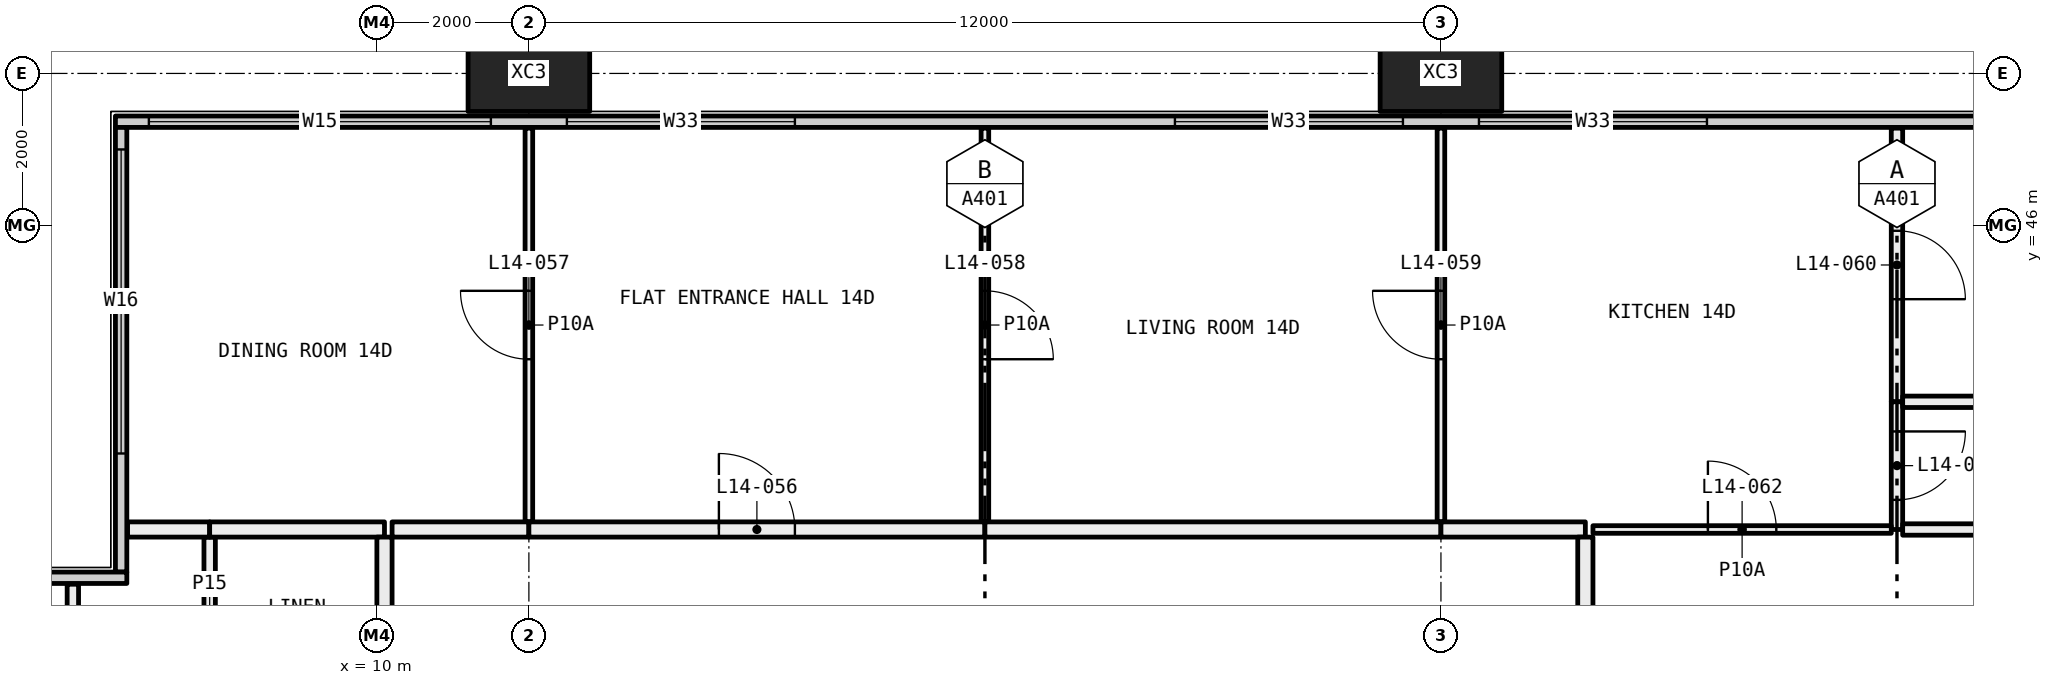
"""IFC4 building model, lengths in metres.
Left out: names, types, materials, properties, quantities, classifications, styles, units other than length and angle.
Written with IfcOpenShell. Run it as: python <this file> out.ifc"""

import sys

from ifc_helpers import new_model, si_unit, direction, frame, frame_2d, origin, origin_2d, place, context, subcontext, project, spatial, rectangle, hollow_rectangle, extrude, element, fill, save


model = new_model("IFC4")
c1 = context("Model", 3, precision=1e-05, world=origin(), true_north=direction((0.0, 1.0)))
c2 = subcontext(c1, "Body", "Model", "MODEL_VIEW")
j1 = project(units=[si_unit("LENGTHUNIT", "METRE"), si_unit("PLANEANGLEUNIT", "RADIAN")], contexts=[c1])
p1 = place(None, origin())
s1 = spatial("IfcSite", under=j1, at=p1, CompositionType="ELEMENT")
p2 = place(p1, origin())
s2 = spatial("IfcBuilding", under=s1, at=p2, CompositionType="ELEMENT")
p3 = place(p2, frame((0.0, 0.0, 61.05)))
s3 = spatial("IfcBuildingStorey", under=s2, at=p3, CompositionType="ELEMENT", Elevation=61.05)
for number, where, z_axis, x_axis in (
    (1, (12.0, 48.0, -0.4), (0.0, 0.0, 1.0), (1.0, 0.0, 0.0)),
    (2, (24.0, 48.0, -0.4), (0.0, 0.0, 1.0), (1.0, 0.0, 0.0)),
):
    element("IfcColumn", number, at=place(p3, frame(where, z_axis=z_axis, x_axis=x_axis)), inside=s3, PredefinedType="COLUMN", context=c2, shape_type="SweptSolid", body=[
        extrude(hollow_rectangle(XDim=1.6, YDim=1.0, WallThickness=0.065, at=origin_2d()), origin(), (0.0, 0.0, 1.0), 3.45),
    ])
p4 = place(p3, frame((6.56, 47.365, 0.0), z_axis=(0.0, 0.0, 1.0), x_axis=(1.0, 0.0, 0.0)))
e3 = element("IfcWall", 3, at=p4, inside=s3, PredefinedType="ELEMENTEDWALL", context=c2, shape_type="SweptSolid", body=[
    extrude(rectangle(XDim=58.88, YDim=0.15, at=frame_2d((29.44, 0.0))), origin(), (0.0, 0.0, 1.0), 3.05),
])
p5 = place(p4, frame((0.44, 0.0, 0.45)))
e4 = element("IfcOpeningElement", 4, at=p5, cuts=e3, PredefinedType="OPENING", context=c2, shape_type="SweptSolid", body=[
    extrude(rectangle(XDim=4.5, YDim=2.55, at=frame_2d((2.25, 1.275))), frame((0.0, 0.085, 0.0), z_axis=(0.0, -1.0, 0.0), x_axis=(1.0, 0.0, 0.0)), (0.0, 0.0, 1.0), 0.17),
])
p6 = place(p4, frame((5.94, 0.0, 0.45)))
e5 = element("IfcOpeningElement", 5, at=p6, cuts=e3, PredefinedType="OPENING", context=c2, shape_type="SweptSolid", body=[
    extrude(rectangle(XDim=3.0, YDim=2.55, at=frame_2d((1.5, 1.275))), frame((0.0, 0.085, 0.0), z_axis=(0.0, -1.0, 0.0), x_axis=(1.0, 0.0, 0.0)), (0.0, 0.0, 1.0), 0.17),
])
p7 = place(p4, frame((13.94, 0.0, 0.45)))
e6 = element("IfcOpeningElement", 6, at=p7, cuts=e3, PredefinedType="OPENING", context=c2, shape_type="SweptSolid", body=[
    extrude(rectangle(XDim=3.0, YDim=2.55, at=frame_2d((1.5, 1.275))), frame((0.0, 0.085, 0.0), z_axis=(0.0, -1.0, 0.0), x_axis=(1.0, 0.0, 0.0)), (0.0, 0.0, 1.0), 0.17),
])
p8 = place(p4, frame((17.94, 0.0, 0.45)))
e7 = element("IfcOpeningElement", 7, at=p8, cuts=e3, PredefinedType="OPENING", context=c2, shape_type="SweptSolid", body=[
    extrude(rectangle(XDim=3.0, YDim=2.55, at=frame_2d((1.5, 1.275))), frame((0.0, 0.085, 0.0), z_axis=(0.0, -1.0, 0.0), x_axis=(1.0, 0.0, 0.0)), (0.0, 0.0, 1.0), 0.17),
])
p9 = place(p4, frame((26.94, 0.0, 0.45)))
e8 = element("IfcOpeningElement", 8, at=p9, cuts=e3, PredefinedType="OPENING", context=c2, shape_type="SweptSolid", body=[
    extrude(rectangle(XDim=2.0, YDim=2.55, at=frame_2d((1.0, 1.275))), frame((0.0, 0.085, 0.0), z_axis=(0.0, -1.0, 0.0), x_axis=(1.0, 0.0, 0.0)), (0.0, 0.0, 1.0), 0.17),
])
p10 = place(p4, frame((29.94, 0.0, 0.45)))
e9 = element("IfcOpeningElement", 9, at=p10, cuts=e3, PredefinedType="OPENING", context=c2, shape_type="SweptSolid", body=[
    extrude(rectangle(XDim=3.0, YDim=2.55, at=frame_2d((1.5, 1.275))), frame((0.0, 0.085, 0.0), z_axis=(0.0, -1.0, 0.0), x_axis=(1.0, 0.0, 0.0)), (0.0, 0.0, 1.0), 0.17),
])
p11 = place(p4, frame((37.94, 0.0, 0.45)))
e10 = element("IfcOpeningElement", 10, at=p11, cuts=e3, PredefinedType="OPENING", context=c2, shape_type="SweptSolid", body=[
    extrude(rectangle(XDim=3.0, YDim=2.55, at=frame_2d((1.5, 1.275))), frame((0.0, 0.085, 0.0), z_axis=(0.0, -1.0, 0.0), x_axis=(1.0, 0.0, 0.0)), (0.0, 0.0, 1.0), 0.17),
])
p12 = place(p4, frame((41.94, 0.0, 0.45)))
e11 = element("IfcOpeningElement", 11, at=p12, cuts=e3, PredefinedType="OPENING", context=c2, shape_type="SweptSolid", body=[
    extrude(rectangle(XDim=3.0, YDim=2.55, at=frame_2d((1.5, 1.275))), frame((0.0, 0.085, 0.0), z_axis=(0.0, -1.0, 0.0), x_axis=(1.0, 0.0, 0.0)), (0.0, 0.0, 1.0), 0.17),
])
p13 = place(p4, frame((50.94, 0.0, 0.45)))
e12 = element("IfcOpeningElement", 12, at=p13, cuts=e3, PredefinedType="OPENING", context=c2, shape_type="SweptSolid", body=[
    extrude(rectangle(XDim=2.0, YDim=2.55, at=frame_2d((1.0, 1.275))), frame((0.0, 0.085, 0.0), z_axis=(0.0, -1.0, 0.0), x_axis=(1.0, 0.0, 0.0)), (0.0, 0.0, 1.0), 0.17),
])
p14 = place(p4, frame((53.94, 0.0, 0.45)))
e13 = element("IfcOpeningElement", 13, at=p14, cuts=e3, PredefinedType="OPENING", context=c2, shape_type="SweptSolid", body=[
    extrude(rectangle(XDim=4.5, YDim=2.55, at=frame_2d((2.25, 1.275))), frame((0.0, 0.085, 0.0), z_axis=(0.0, -1.0, 0.0), x_axis=(1.0, 0.0, 0.0)), (0.0, 0.0, 1.0), 0.17),
])
p15 = place(p3, frame((6.635, 41.44, 0.0), z_axis=(0.0, 0.0, 1.0), x_axis=(0.0, 1.0, 0.0)))
e14 = element("IfcWall", 14, at=p15, inside=s3, PredefinedType="ELEMENTEDWALL", context=c2, shape_type="SweptSolid", body=[
    extrude(rectangle(XDim=5.85, YDim=0.15, at=frame_2d((2.925, 0.0))), origin(), (0.0, 0.0, 1.0), 3.05),
])
p16 = place(p15, frame((1.56, 0.0, 0.45)))
e15 = element("IfcOpeningElement", 15, at=p16, cuts=e14, PredefinedType="OPENING", context=c2, shape_type="SweptSolid", body=[
    extrude(rectangle(XDim=4.0, YDim=2.55, at=frame_2d((2.0, 1.275))), frame((0.0, 0.085, 0.0), z_axis=(0.0, -1.0, 0.0), x_axis=(1.0, 0.0, 0.0)), (0.0, 0.0, 1.0), 0.17),
])
p17 = place(p3, frame((0.56, 41.365, 0.0), z_axis=(0.0, 0.0, 1.0), x_axis=(1.0, 0.0, 0.0)))
e16 = element("IfcWall", 16, at=p17, inside=s3, PredefinedType="ELEMENTEDWALL", context=c2, shape_type="SweptSolid", body=[
    extrude(rectangle(XDim=6.15, YDim=0.15, at=frame_2d((3.075, 0.0))), origin(), (0.0, 0.0, 1.0), 3.05),
])
p18 = place(p17, frame((0.44, 0.0, 0.45)))
e17 = element("IfcOpeningElement", 17, at=p18, cuts=e16, PredefinedType="OPENING", context=c2, shape_type="SweptSolid", body=[
    extrude(rectangle(XDim=4.0, YDim=2.55, at=frame_2d((2.0, 1.275))), frame((0.0, 0.085, 0.0), z_axis=(0.0, -1.0, 0.0), x_axis=(1.0, 0.0, 0.0)), (0.0, 0.0, 1.0), 0.17),
])
p19 = place(p3, frame((6.0, 39.0, 0.0), z_axis=(0.0, 0.0, 1.0), x_axis=(0.0, 1.0, 0.0)))
e18 = element("IfcWall", 18, at=p19, inside=s3, PredefinedType="PARTITIONING", context=c2, shape_type="SweptSolid", body=[
    extrude(rectangle(XDim=2.28, YDim=0.15, at=frame_2d((1.14, 0.0))), origin(), (0.0, 0.0, 1.0), 3.05),
])
p20 = place(p19, frame((0.69, 0.0, 0.0)))
e19 = element("IfcOpeningElement", 19, at=p20, cuts=e18, PredefinedType="OPENING", context=c2, shape_type="SweptSolid", body=[
    extrude(rectangle(XDim=0.9, YDim=2.1, at=frame_2d((0.45, 1.05))), frame((0.0, 0.085, 0.0), z_axis=(0.0, -1.0, 0.0), x_axis=(1.0, 0.0, 0.0)), (0.0, 0.0, 1.0), 0.17),
])
p21 = place(p3, frame((7.8, 39.075, 0.0), z_axis=(0.0, 0.0, 1.0), x_axis=(0.0, 1.0, 0.0)))
e20 = element("IfcWall", 20, at=p21, inside=s3, PredefinedType="PARTITIONING", context=c2, shape_type="SweptSolid", body=[
    extrude(rectangle(XDim=2.825, YDim=0.15, at=frame_2d((1.413, 0.0))), origin(), (0.0, 0.0, 1.0), 3.05),
])
p22 = place(p3, frame((7.8, 42.0, 0.0), z_axis=(0.0, 0.0, 1.0), x_axis=(-1.0, 0.0, 0.0)))
e21 = element("IfcWall", 21, at=p22, inside=s3, PredefinedType="PARTITIONING", context=c2, shape_type="SweptSolid", body=[
    extrude(rectangle(XDim=1.08, YDim=0.2, at=frame_2d((0.54, 0.0))), origin(), (0.0, 0.0, 1.0), 3.05),
])
p23 = place(p3, frame((10.1, 42.0, 0.0), z_axis=(0.0, 0.0, 1.0), x_axis=(-1.0, 0.0, 0.0)))
e22 = element("IfcWall", 22, at=p23, inside=s3, PredefinedType="PARTITIONING", context=c2, shape_type="SweptSolid", body=[
    extrude(rectangle(XDim=2.3, YDim=0.2, at=frame_2d((1.15, 0.0))), origin(), (0.0, 0.0, 1.0), 3.05),
])
p24 = place(p3, frame((10.1, 39.0, 0.0), z_axis=(0.0, 0.0, 1.0), x_axis=(0.0, 1.0, 0.0)))
e23 = element("IfcWall", 23, at=p24, inside=s3, PredefinedType="PARTITIONING", context=c2, shape_type="SweptSolid", body=[
    extrude(rectangle(XDim=2.9, YDim=0.2, at=frame_2d((1.45, 0.0))), origin(), (0.0, 0.0, 1.0), 3.05),
])
p25 = place(p3, frame((12.0, 42.1, 0.0), z_axis=(0.0, 0.0, 1.0), x_axis=(0.0, 1.0, 0.0)))
e24 = element("IfcWall", 24, at=p25, inside=s3, PredefinedType="PARTITIONING", context=c2, shape_type="SweptSolid", body=[
    extrude(rectangle(XDim=5.18, YDim=0.1, at=frame_2d((2.59, 0.0))), origin(), (0.0, 0.0, 1.0), 3.05),
])
p26 = place(p25, frame((2.14, 0.0, 0.0)))
e25 = element("IfcOpeningElement", 25, at=p26, cuts=e24, PredefinedType="OPENING", context=c2, shape_type="SweptSolid", body=[
    extrude(rectangle(XDim=0.9, YDim=2.1, at=frame_2d((0.45, 1.05))), frame((0.0, 0.06, 0.0), z_axis=(0.0, -1.0, 0.0), x_axis=(1.0, 0.0, 0.0)), (0.0, 0.0, 1.0), 0.12),
])
p27 = place(p3, frame((10.2, 42.0, 0.0), z_axis=(0.0, 0.0, 1.0), x_axis=(1.0, 0.0, 0.0)))
e26 = element("IfcWall", 26, at=p27, inside=s3, PredefinedType="PARTITIONING", context=c2, shape_type="SweptSolid", body=[
    extrude(rectangle(XDim=1.8, YDim=0.2, at=frame_2d((0.9, 0.0))), origin(), (0.0, 0.0, 1.0), 3.05),
])
p28 = place(p3, frame((18.0, 42.1, 0.0), z_axis=(0.0, 0.0, 1.0), x_axis=(0.0, 1.0, 0.0)))
e27 = element("IfcWall", 27, at=p28, inside=s3, PredefinedType="PARTITIONING", context=c2, shape_type="SweptSolid", body=[
    extrude(rectangle(XDim=5.18, YDim=0.1, at=frame_2d((2.59, 0.0))), origin(), (0.0, 0.0, 1.0), 3.05),
])
p29 = place(p28, frame((2.14, 0.0, 0.0)))
e28 = element("IfcOpeningElement", 28, at=p29, cuts=e27, PredefinedType="OPENING", context=c2, shape_type="SweptSolid", body=[
    extrude(rectangle(XDim=0.9, YDim=2.1, at=frame_2d((0.45, 1.05))), frame((0.0, 0.06, 0.0), z_axis=(0.0, -1.0, 0.0), x_axis=(1.0, 0.0, 0.0)), (0.0, 0.0, 1.0), 0.12),
])
p30 = place(p3, frame((12.0, 42.0, 0.0), z_axis=(0.0, 0.0, 1.0), x_axis=(1.0, 0.0, 0.0)))
e29 = element("IfcWall", 29, at=p30, inside=s3, PredefinedType="PARTITIONING", context=c2, shape_type="SweptSolid", body=[
    extrude(rectangle(XDim=6.0, YDim=0.2, at=frame_2d((3.0, 0.0))), origin(), (0.0, 0.0, 1.0), 3.05),
])
p31 = place(p30, frame((2.5, 0.0, 0.0)))
e30 = element("IfcOpeningElement", 30, at=p31, cuts=e29, PredefinedType="OPENING", context=c2, shape_type="SweptSolid", body=[
    extrude(rectangle(XDim=1.0, YDim=2.1, at=frame_2d((0.5, 1.05))), frame((0.0, 0.11, 0.0), z_axis=(0.0, -1.0, 0.0), x_axis=(1.0, 0.0, 0.0)), (0.0, 0.0, 1.0), 0.22),
])
p32 = place(p3, frame((24.0, 42.1, 0.0), z_axis=(0.0, 0.0, 1.0), x_axis=(0.0, 1.0, 0.0)))
e31 = element("IfcWall", 31, at=p32, inside=s3, PredefinedType="PARTITIONING", context=c2, shape_type="SweptSolid", body=[
    extrude(rectangle(XDim=5.18, YDim=0.1, at=frame_2d((2.59, 0.0))), origin(), (0.0, 0.0, 1.0), 3.05),
])
p33 = place(p32, frame((2.14, 0.0, 0.0)))
e32 = element("IfcOpeningElement", 32, at=p33, cuts=e31, PredefinedType="OPENING", context=c2, shape_type="SweptSolid", body=[
    extrude(rectangle(XDim=0.9, YDim=2.1, at=frame_2d((0.45, 1.05))), frame((0.0, 0.06, 0.0), z_axis=(0.0, -1.0, 0.0), x_axis=(1.0, 0.0, 0.0)), (0.0, 0.0, 1.0), 0.12),
])
p34 = place(p3, frame((18.0, 42.0, 0.0), z_axis=(0.0, 0.0, 1.0), x_axis=(1.0, 0.0, 0.0)))
e33 = element("IfcWall", 33, at=p34, inside=s3, PredefinedType="PARTITIONING", context=c2, shape_type="SweptSolid", body=[
    extrude(rectangle(XDim=6.0, YDim=0.2, at=frame_2d((3.0, 0.0))), origin(), (0.0, 0.0, 1.0), 3.05),
])
p35 = place(p3, frame((30.0, 43.68, 0.0), z_axis=(0.0, 0.0, 1.0), x_axis=(0.0, 1.0, 0.0)))
e34 = element("IfcWall", 34, at=p35, inside=s3, PredefinedType="PARTITIONING", context=c2, shape_type="SweptSolid", body=[
    extrude(rectangle(XDim=3.6, YDim=0.15, at=frame_2d((1.8, 0.0))), origin(), (0.0, 0.0, 1.0), 3.05),
])
p36 = place(p35, frame((1.35, 0.0, 0.0)))
e35 = element("IfcOpeningElement", 35, at=p36, cuts=e34, PredefinedType="OPENING", context=c2, shape_type="SweptSolid", body=[
    extrude(rectangle(XDim=0.9, YDim=2.1, at=frame_2d((0.45, 1.05))), frame((0.0, 0.085, 0.0), z_axis=(0.0, -1.0, 0.0), x_axis=(1.0, 0.0, 0.0)), (0.0, 0.0, 1.0), 0.17),
])
p37 = place(p3, frame((30.0, 42.0, 0.0), z_axis=(0.0, 0.0, 1.0), x_axis=(0.0, 1.0, 0.0)))
e36 = element("IfcWall", 36, at=p37, inside=s3, PredefinedType="PARTITIONING", context=c2, shape_type="SweptSolid", body=[
    extrude(rectangle(XDim=1.68, YDim=0.15, at=frame_2d((0.84, 0.0))), origin(), (0.0, 0.0, 1.0), 3.05),
])
p38 = place(p37, frame((0.39, 0.0, 0.0)))
e37 = element("IfcOpeningElement", 37, at=p38, cuts=e36, PredefinedType="OPENING", context=c2, shape_type="SweptSolid", body=[
    extrude(rectangle(XDim=0.9, YDim=2.1, at=frame_2d((0.45, 1.05))), frame((0.0, 0.085, 0.0), z_axis=(0.0, -1.0, 0.0), x_axis=(1.0, 0.0, 0.0)), (0.0, 0.0, 1.0), 0.17),
])
p39 = place(p3, frame((26.0, 42.0, 0.0), z_axis=(0.0, 0.0, 1.0), x_axis=(1.0, 0.0, 0.0)))
e38 = element("IfcWall", 38, at=p39, inside=s3, PredefinedType="PARTITIONING", context=c2, shape_type="SweptSolid", body=[
    extrude(rectangle(XDim=3.925, YDim=0.1, at=frame_2d((1.962, 0.0))), origin(), (0.0, 0.0, 1.0), 3.05),
])
p40 = place(p39, frame((1.512, 0.0, 0.0)))
e39 = element("IfcOpeningElement", 39, at=p40, cuts=e38, PredefinedType="OPENING", context=c2, shape_type="SweptSolid", body=[
    extrude(rectangle(XDim=0.9, YDim=2.1, at=frame_2d((0.45, 1.05))), frame((0.0, 0.06, 0.0), z_axis=(0.0, -1.0, 0.0), x_axis=(1.0, 0.0, 0.0)), (0.0, 0.0, 1.0), 0.12),
])
p41 = place(p3, frame((24.0, 42.0, 0.0), z_axis=(0.0, 0.0, 1.0), x_axis=(1.0, 0.0, 0.0)))
e40 = element("IfcWall", 40, at=p41, inside=s3, PredefinedType="PARTITIONING", context=c2, shape_type="SweptSolid", body=[
    extrude(rectangle(XDim=1.9, YDim=0.2, at=frame_2d((0.95, 0.0))), origin(), (0.0, 0.0, 1.0), 3.05),
])
p42 = place(p3, frame((30.075, 43.68, 0.0), z_axis=(0.0, 0.0, 1.0), x_axis=(1.0, 0.0, 0.0)))
e41 = element("IfcWall", 41, at=p42, inside=s3, PredefinedType="PARTITIONING", context=c2, shape_type="SweptSolid", body=[
    extrude(rectangle(XDim=5.925, YDim=0.15, at=frame_2d((2.962, 0.0))), origin(), (0.0, 0.0, 1.0), 2.45),
])
p43 = place(p3, frame((30.075, 42.0, 0.0), z_axis=(0.0, 0.0, 1.0), x_axis=(1.0, 0.0, 0.0)))
e42 = element("IfcWall", 42, at=p43, inside=s3, PredefinedType="PARTITIONING", context=c2, shape_type="SweptSolid", body=[
    extrude(rectangle(XDim=1.425, YDim=0.15, at=frame_2d((0.712, 0.0))), origin(), (0.0, 0.0, 1.0), 3.05),
])
p44 = place(p3, frame((25.9, 41.9, 0.0), z_axis=(0.0, 0.0, 1.0), x_axis=(0.0, -1.0, 0.0)))
e43 = element("IfcWall", 43, at=p44, inside=s3, PredefinedType="PARTITIONING", context=c2, shape_type="SweptSolid", body=[
    extrude(rectangle(XDim=6.2, YDim=0.2, at=frame_2d((3.1, 0.0))), origin(), (0.0, 0.0, 1.0), 2.45),
])
p45 = place(p5, origin())
e44 = element("IfcWindow", 44, at=p45, inside=s3, PartitioningType="SINGLE_PANEL", PredefinedType="WINDOW", context=c2, shape_type="SweptSolid", body=[
    extrude(rectangle(XDim=4.5, YDim=2.55, at=frame_2d((2.25, 1.275))), frame((0.0, 0.03, 0.0), z_axis=(0.0, -1.0, 0.0), x_axis=(1.0, 0.0, 0.0)), (0.0, 0.0, 1.0), 0.06),
])
fill(e4, e44)
p46 = place(p6, origin())
e45 = element("IfcWindow", 45, at=p46, inside=s3, PartitioningType="SINGLE_PANEL", PredefinedType="WINDOW", context=c2, shape_type="SweptSolid", body=[
    extrude(rectangle(XDim=3.0, YDim=2.55, at=frame_2d((1.5, 1.275))), frame((0.0, 0.03, 0.0), z_axis=(0.0, -1.0, 0.0), x_axis=(1.0, 0.0, 0.0)), (0.0, 0.0, 1.0), 0.06),
])
fill(e5, e45)
p47 = place(p7, origin())
e46 = element("IfcWindow", 46, at=p47, inside=s3, PartitioningType="SINGLE_PANEL", PredefinedType="WINDOW", context=c2, shape_type="SweptSolid", body=[
    extrude(rectangle(XDim=3.0, YDim=2.55, at=frame_2d((1.5, 1.275))), frame((0.0, 0.03, 0.0), z_axis=(0.0, -1.0, 0.0), x_axis=(1.0, 0.0, 0.0)), (0.0, 0.0, 1.0), 0.06),
])
fill(e6, e46)
p48 = place(p8, origin())
e47 = element("IfcWindow", 47, at=p48, inside=s3, PartitioningType="SINGLE_PANEL", PredefinedType="WINDOW", context=c2, shape_type="SweptSolid", body=[
    extrude(rectangle(XDim=3.0, YDim=2.55, at=frame_2d((1.5, 1.275))), frame((0.0, 0.03, 0.0), z_axis=(0.0, -1.0, 0.0), x_axis=(1.0, 0.0, 0.0)), (0.0, 0.0, 1.0), 0.06),
])
fill(e7, e47)
p49 = place(p16, origin())
e48 = element("IfcWindow", 48, at=p49, inside=s3, PartitioningType="SINGLE_PANEL", PredefinedType="WINDOW", context=c2, shape_type="SweptSolid", body=[
    extrude(rectangle(XDim=4.0, YDim=2.55, at=frame_2d((2.0, 1.275))), frame((0.0, 0.03, 0.0), z_axis=(0.0, -1.0, 0.0), x_axis=(1.0, 0.0, 0.0)), (0.0, 0.0, 1.0), 0.06),
])
fill(e15, e48)
p50 = place(p31, origin())
e49 = element("IfcDoor", 49, at=p50, inside=s3, OperationType="SINGLE_SWING_RIGHT", PredefinedType="DOOR", context=c2, shape_type="SweptSolid", body=[
    extrude(rectangle(XDim=1.0, YDim=2.1, at=frame_2d((0.5, 1.05))), frame((0.0, 0.025, 0.0), z_axis=(0.0, -1.0, 0.0), x_axis=(1.0, 0.0, 0.0)), (0.0, 0.0, 1.0), 0.05),
])
fill(e30, e49)
p51 = place(p26, origin())
e50 = element("IfcDoor", 50, at=p51, inside=s3, OperationType="SINGLE_SWING_LEFT", PredefinedType="DOOR", context=c2, shape_type="SweptSolid", body=[
    extrude(rectangle(XDim=0.9, YDim=2.1, at=frame_2d((0.45, 1.05))), frame((0.0, 0.025, 0.0), z_axis=(0.0, -1.0, 0.0), x_axis=(1.0, 0.0, 0.0)), (0.0, 0.0, 1.0), 0.05),
])
fill(e25, e50)
p52 = place(p29, frame((0.9, 0.0, 0.0), x_axis=(-1.0, 0.0, 0.0)))
e51 = element("IfcDoor", 51, at=p52, inside=s3, OperationType="SINGLE_SWING_LEFT", PredefinedType="DOOR", context=c2, shape_type="SweptSolid", body=[
    extrude(rectangle(XDim=0.9, YDim=2.1, at=frame_2d((0.45, 1.05))), frame((0.0, 0.025, 0.0), z_axis=(0.0, -1.0, 0.0), x_axis=(1.0, 0.0, 0.0)), (0.0, 0.0, 1.0), 0.05),
])
fill(e28, e51)
p53 = place(p33, origin())
e52 = element("IfcDoor", 52, at=p53, inside=s3, OperationType="SINGLE_SWING_LEFT", PredefinedType="DOOR", context=c2, shape_type="SweptSolid", body=[
    extrude(rectangle(XDim=0.9, YDim=2.1, at=frame_2d((0.45, 1.05))), frame((0.0, 0.025, 0.0), z_axis=(0.0, -1.0, 0.0), x_axis=(1.0, 0.0, 0.0)), (0.0, 0.0, 1.0), 0.05),
])
fill(e32, e52)
p54 = place(p36, frame((0.9, 0.0, 0.0), x_axis=(-1.0, 0.0, 0.0)))
e53 = element("IfcDoor", 53, at=p54, inside=s3, OperationType="SINGLE_SWING_LEFT", PredefinedType="DOOR", context=c2, shape_type="SweptSolid", body=[
    extrude(rectangle(XDim=0.9, YDim=2.1, at=frame_2d((0.45, 1.05))), frame((0.0, 0.025, 0.0), z_axis=(0.0, -1.0, 0.0), x_axis=(1.0, 0.0, 0.0)), (0.0, 0.0, 1.0), 0.05),
])
fill(e35, e53)
p55 = place(p38, frame((0.9, 0.0, 0.0), x_axis=(-1.0, 0.0, 0.0)))
e54 = element("IfcDoor", 54, at=p55, inside=s3, OperationType="SINGLE_SWING_RIGHT", PredefinedType="DOOR", context=c2, shape_type="SweptSolid", body=[
    extrude(rectangle(XDim=0.9, YDim=2.1, at=frame_2d((0.45, 1.05))), frame((0.0, 0.025, 0.0), z_axis=(0.0, -1.0, 0.0), x_axis=(1.0, 0.0, 0.0)), (0.0, 0.0, 1.0), 0.05),
])
fill(e37, e54)
p56 = place(p40, origin())
e55 = element("IfcDoor", 55, at=p56, inside=s3, OperationType="SINGLE_SWING_RIGHT", PredefinedType="DOOR", context=c2, shape_type="SweptSolid", body=[
    extrude(rectangle(XDim=0.9, YDim=2.1, at=frame_2d((0.45, 1.05))), frame((0.0, 0.025, 0.0), z_axis=(0.0, -1.0, 0.0), x_axis=(1.0, 0.0, 0.0)), (0.0, 0.0, 1.0), 0.05),
])
fill(e39, e55)
save(model, sys.argv[1])
